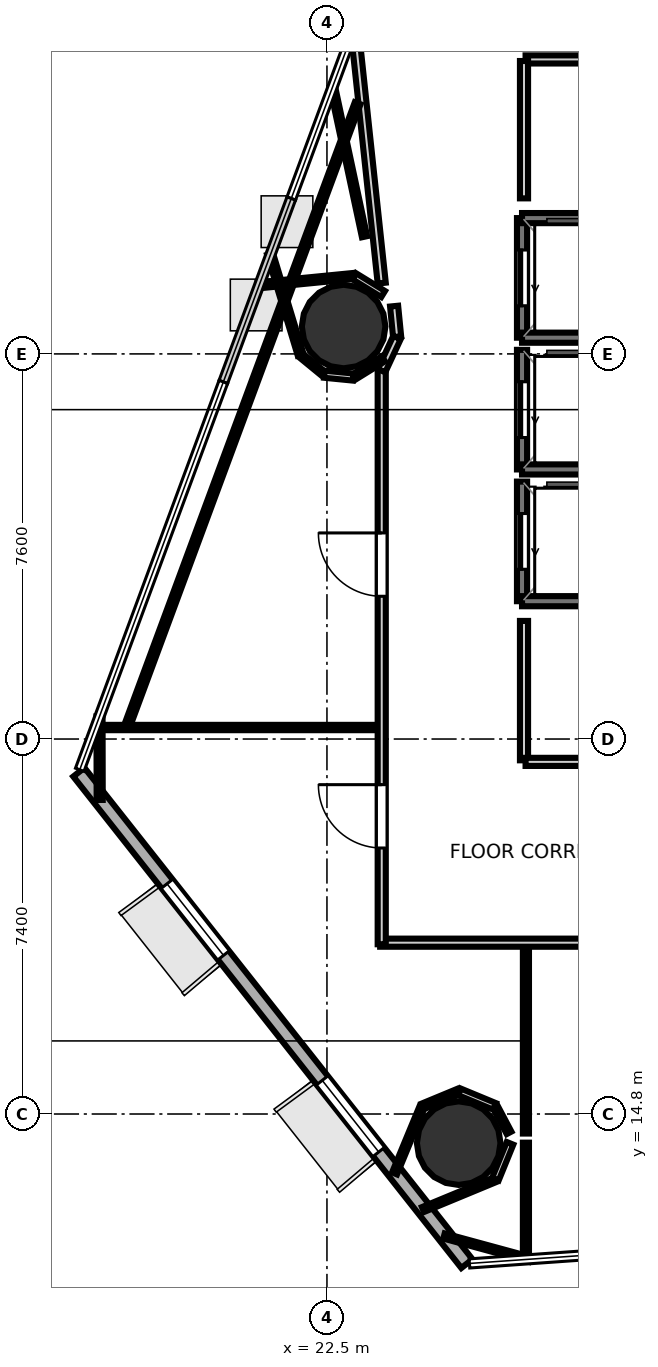
"""IFC4 building model, lengths in metres.
Left out: names, types, materials, properties, quantities, classifications, styles, units other than length and angle.
Written with IfcOpenShell. Run it as: python <this file> out.ifc"""

import sys

from ifc_helpers import new_model, si_unit, direction, frame, frame_2d, origin, origin_2d, place, context, subcontext, project, spatial, rectangle, hollow_circle, extrude, element, fill, save


model = new_model("IFC4")
c1 = context("Model", 3, precision=1e-05, world=origin(), true_north=direction((0.0, 1.0)))
c2 = subcontext(c1, "Body", "Model", "MODEL_VIEW")
j1 = project(units=[si_unit("LENGTHUNIT", "METRE"), si_unit("PLANEANGLEUNIT", "RADIAN")], contexts=[c1])
p1 = place(None, origin())
s1 = spatial("IfcSite", under=j1, at=p1, CompositionType="ELEMENT")
p2 = place(p1, origin())
s2 = spatial("IfcBuilding", under=s1, at=p2, CompositionType="ELEMENT")
p3 = place(p2, frame((0.0, 0.0, 59.9)))
s3 = spatial("IfcBuildingStorey", under=s2, at=p3, CompositionType="ELEMENT", Elevation=59.9)
for number, where, z_axis, x_axis in (
    (1, (22.829, 30.34, 0.0), (0.0, 0.0, 1.0), (1.0, 0.0, 0.0)),
    (2, (25.1, 14.225, 0.0), (0.0, 0.0, 1.0), (1.0, 0.0, 0.0)),
):
    element("IfcColumn", number, at=place(p3, frame(where, z_axis=z_axis, x_axis=x_axis)), inside=s3, PredefinedType="COLUMN", context=c2, shape_type="SweptSolid", body=[
        extrude(hollow_circle(Radius=0.825, WallThickness=0.04, at=origin_2d()), origin(), (0.0, 0.0, 1.0), 3.7),
    ])
p4 = place(p3, frame((17.604, 21.546, 0.0), z_axis=(0.0, 0.0, 1.0), x_axis=(0.619700014563, -0.784838768124, 0.0)))
e3 = element("IfcWall", 3, at=p4, inside=s3, PredefinedType="SOLIDWALL", context=c2, shape_type="SweptSolid", body=[
    extrude(rectangle(XDim=12.358, YDim=0.28, at=frame_2d((6.179, 0.0))), origin(), (0.0, 0.0, 1.0), 3.52),
])
p5 = place(p4, frame((2.807, 0.0, 0.85)))
e4 = element("IfcOpeningElement", 4, at=p5, cuts=e3, PredefinedType="OPENING", context=c2, shape_type="SweptSolid", body=[
    extrude(rectangle(XDim=1.8, YDim=2.1, at=frame_2d((0.9, 1.05))), frame((0.0, 0.15, 0.0), z_axis=(0.0, -1.0, 0.0), x_axis=(1.0, 0.0, 0.0)), (0.0, 0.0, 1.0), 0.3),
])
p6 = place(p4, frame((7.75, 0.0, 0.85)))
e5 = element("IfcOpeningElement", 5, at=p6, cuts=e3, PredefinedType="OPENING", context=c2, shape_type="SweptSolid", body=[
    extrude(rectangle(XDim=1.8, YDim=2.1, at=frame_2d((0.9, 1.05))), frame((0.0, 0.15, 0.0), z_axis=(0.0, -1.0, 0.0), x_axis=(1.0, 0.0, 0.0)), (0.0, 0.0, 1.0), 0.3),
])
p7 = place(p3, frame((26.35, 30.12, 0.0), z_axis=(0.0, 0.0, 1.0), x_axis=(0.0, 1.0, 0.0)))
e6 = element("IfcWall", 6, at=p7, inside=s3, PredefinedType="SOLIDWALL", context=c2, shape_type="SweptSolid", body=[
    extrude(rectangle(XDim=2.36, YDim=0.2, at=frame_2d((1.18, 0.0))), origin(), (0.0, 0.0, 1.0), 3.52),
])
p8 = place(p7, frame((0.63, 0.0, 0.0)))
e7 = element("IfcOpeningElement", 7, at=p8, cuts=e6, PredefinedType="OPENING", context=c2, shape_type="SweptSolid", body=[
    extrude(rectangle(XDim=1.1, YDim=2.15, at=frame_2d((0.55, 1.075))), frame((0.0, 0.11, 0.0), z_axis=(0.0, -1.0, 0.0), x_axis=(1.0, 0.0, 0.0)), (0.0, 0.0, 1.0), 0.22),
])
for number, where, z_axis, x_axis in (
    (8, (26.35, 32.48, 0.0), (0.0, 0.0, 1.0), (1.0, 0.0, 0.0)),
    (9, (26.35, 30.12, 0.0), (0.0, 0.0, 1.0), (1.0, 0.0, 0.0)),
):
    element("IfcWall", number, at=place(p3, frame(where, z_axis=z_axis, x_axis=x_axis)), inside=s3, PredefinedType="SOLIDWALL", context=c2, shape_type="SweptSolid", body=[
        extrude(rectangle(XDim=2.1, YDim=0.2, at=frame_2d((1.05, 0.0))), origin(), (0.0, 0.0, 1.0), 3.52),
    ])
p9 = place(p3, frame((26.35, 27.52, 0.0), z_axis=(0.0, 0.0, 1.0), x_axis=(0.0, 1.0, 0.0)))
e10 = element("IfcWall", 10, at=p9, inside=s3, PredefinedType="SOLIDWALL", context=c2, shape_type="SweptSolid", body=[
    extrude(rectangle(XDim=2.36, YDim=0.2, at=frame_2d((1.18, 0.0))), origin(), (0.0, 0.0, 1.0), 3.52),
])
p10 = place(p9, frame((0.63, 0.0, 0.0)))
e11 = element("IfcOpeningElement", 11, at=p10, cuts=e10, PredefinedType="OPENING", context=c2, shape_type="SweptSolid", body=[
    extrude(rectangle(XDim=1.1, YDim=2.15, at=frame_2d((0.55, 1.075))), frame((0.0, 0.11, 0.0), z_axis=(0.0, -1.0, 0.0), x_axis=(1.0, 0.0, 0.0)), (0.0, 0.0, 1.0), 0.22),
])
p11 = place(p3, frame((26.35, 27.52, 0.0), z_axis=(0.0, 0.0, 1.0), x_axis=(1.0, 0.0, 0.0)))
e12 = element("IfcWall", 12, at=p11, inside=s3, PredefinedType="SOLIDWALL", context=c2, shape_type="SweptSolid", body=[
    extrude(rectangle(XDim=2.1, YDim=0.2, at=frame_2d((1.05, 0.0))), origin(), (0.0, 0.0, 1.0), 3.52),
])
p12 = place(p3, frame((26.35, 24.92, 0.0), z_axis=(0.0, 0.0, 1.0), x_axis=(0.0, 1.0, 0.0)))
e13 = element("IfcWall", 13, at=p12, inside=s3, PredefinedType="SOLIDWALL", context=c2, shape_type="SweptSolid", body=[
    extrude(rectangle(XDim=2.36, YDim=0.2, at=frame_2d((1.18, 0.0))), origin(), (0.0, 0.0, 1.0), 3.52),
])
p13 = place(p12, frame((0.63, 0.0, 0.0)))
e14 = element("IfcOpeningElement", 14, at=p13, cuts=e13, PredefinedType="OPENING", context=c2, shape_type="SweptSolid", body=[
    extrude(rectangle(XDim=1.1, YDim=2.15, at=frame_2d((0.55, 1.075))), frame((0.0, 0.11, 0.0), z_axis=(0.0, -1.0, 0.0), x_axis=(1.0, 0.0, 0.0)), (0.0, 0.0, 1.0), 0.22),
])
p14 = place(p3, frame((26.35, 24.92, 0.0), z_axis=(0.0, 0.0, 1.0), x_axis=(1.0, 0.0, 0.0)))
e15 = element("IfcWall", 15, at=p14, inside=s3, PredefinedType="SOLIDWALL", context=c2, shape_type="SweptSolid", body=[
    extrude(rectangle(XDim=2.1, YDim=0.2, at=frame_2d((1.05, 0.0))), origin(), (0.0, 0.0, 1.0), 3.52),
])
p15 = place(p3, frame((23.581, 31.197, 0.0), z_axis=(0.0, 0.0, 1.0), x_axis=(-0.106272750785, 0.994337016529, 0.0)))
e16 = element("IfcWall", 16, at=p15, inside=s3, PredefinedType="PARTITIONING", context=c2, shape_type="SweptSolid", body=[
    extrude(rectangle(XDim=5.065, YDim=0.16, at=frame_2d((2.533, 0.0))), origin(), (0.0, 0.0, 1.0), 2.798),
])
p16 = place(p3, frame((29.7, 35.611, 0.0), z_axis=(0.0, 0.0, 1.0), x_axis=(-1.0, 0.0, 0.0)))
e17 = element("IfcWall", 17, at=p16, inside=s3, PredefinedType="PARTITIONING", context=c2, shape_type="SweptSolid", body=[
    extrude(rectangle(XDim=3.28, YDim=0.16, at=frame_2d((1.64, 0.0))), origin(), (0.0, 0.0, 1.0), 2.798),
])
p17 = place(p3, frame((26.389, 35.58, 0.0), z_axis=(0.0, 0.0, 1.0), x_axis=(0.0, -1.0, 0.0)))
e18 = element("IfcWall", 18, at=p17, inside=s3, PredefinedType="PARTITIONING", context=c2, shape_type="SweptSolid", body=[
    extrude(rectangle(XDim=2.71, YDim=0.16, at=frame_2d((1.355, 0.0))), origin(), (0.0, 0.0, 1.0), 2.798),
])
p18 = place(p3, frame((26.389, 24.531, 0.0), z_axis=(0.0, 0.0, 1.0), x_axis=(0.0, -1.0, 0.0)))
e19 = element("IfcWall", 19, at=p18, inside=s3, PredefinedType="PARTITIONING", context=c2, shape_type="SweptSolid", body=[
    extrude(rectangle(XDim=2.75, YDim=0.16, at=frame_2d((1.375, 0.0))), origin(), (0.0, 0.0, 1.0), 2.84),
])
p19 = place(p3, frame((26.42, 21.749, 0.0), z_axis=(0.0, 0.0, 1.0), x_axis=(1.0, 0.0, 0.0)))
e20 = element("IfcWall", 20, at=p19, inside=s3, PredefinedType="PARTITIONING", context=c2, shape_type="SweptSolid", body=[
    extrude(rectangle(XDim=3.28, YDim=0.16, at=frame_2d((1.64, 0.0))), origin(), (0.0, 0.0, 1.0), 2.84),
])
p20 = place(p3, frame((33.32, 18.181, 0.0), z_axis=(0.0, 0.0, 1.0), x_axis=(-1.0, 0.0, 0.0)))
e21 = element("IfcWall", 21, at=p20, inside=s3, PredefinedType="PARTITIONING", context=c2, shape_type="SweptSolid", body=[
    extrude(rectangle(XDim=9.77, YDim=0.16, at=frame_2d((4.885, 0.0))), origin(), (0.0, 0.0, 1.0), 2.798),
])
p21 = place(p3, frame((23.581, 18.15, 0.0), z_axis=(0.0, 0.0, 1.0), x_axis=(0.0, 1.0, 0.0)))
e22 = element("IfcWall", 22, at=p21, inside=s3, PredefinedType="PARTITIONING", context=c2, shape_type="SweptSolid", body=[
    extrude(rectangle(XDim=11.333, YDim=0.16, at=frame_2d((5.667, 0.0))), origin(), (0.0, 0.0, 1.0), 2.798),
])
p22 = place(p21, frame((1.899, 0.0, 0.0)))
e23 = element("IfcOpeningElement", 23, at=p22, cuts=e22, PredefinedType="OPENING", context=c2, shape_type="SweptSolid", body=[
    extrude(rectangle(XDim=1.25, YDim=2.2, at=frame_2d((0.625, 1.1))), frame((0.0, 0.09, 0.0), z_axis=(0.0, -1.0, 0.0), x_axis=(1.0, 0.0, 0.0)), (0.0, 0.0, 1.0), 0.18),
])
p23 = place(p21, frame((6.867, 0.0, 0.0)))
e24 = element("IfcOpeningElement", 24, at=p23, cuts=e22, PredefinedType="OPENING", context=c2, shape_type="SweptSolid", body=[
    extrude(rectangle(XDim=1.25, YDim=2.2, at=frame_2d((0.625, 1.1))), frame((0.0, 0.09, 0.0), z_axis=(0.0, -1.0, 0.0), x_axis=(1.0, 0.0, 0.0)), (0.0, 0.0, 1.0), 0.18),
])
p24 = place(p3, frame((23.578, 29.47, 0.0), z_axis=(0.0, 0.0, 1.0), x_axis=(0.421827918194, 0.906675910914, 0.0)))
e25 = element("IfcWall", 25, at=p24, inside=s3, PredefinedType="PARTITIONING", context=c2, shape_type="SweptSolid", body=[
    extrude(rectangle(XDim=0.72, YDim=0.16, at=frame_2d((0.36, 0.0))), origin(), (0.0, 0.0, 1.0), 2.84),
])
p25 = place(p3, frame((23.885, 30.139, 0.0), z_axis=(0.0, 0.0, 1.0), x_axis=(-0.0981888168, 0.995167803064, 0.0)))
e26 = element("IfcWall", 26, at=p25, inside=s3, PredefinedType="PARTITIONING", context=c2, shape_type="SweptSolid", body=[
    extrude(rectangle(XDim=0.607, YDim=0.16, at=frame_2d((0.303, 0.0))), origin(), (0.0, 0.0, 1.0), 2.84),
])
p26 = place(p3, frame((26.427, 18.07, 0.0), z_axis=(0.0, 0.0, 1.0), x_axis=(0.0, -1.0, 0.0)))
e27 = element("IfcWall", 27, at=p26, inside=s3, PredefinedType="PARTITIONING", context=c2, shape_type="SweptSolid", body=[
    extrude(rectangle(XDim=3.656, YDim=0.12, at=frame_2d((1.828, 0.0))), origin(), (0.0, 0.0, 1.0), 2.798),
])
p27 = place(p3, frame((26.094, 14.428, 0.0), z_axis=(0.0, 0.0, 1.0), x_axis=(-0.468979373437, 0.883209118663, 0.0)))
e28 = element("IfcWall", 28, at=p27, inside=s3, PredefinedType="PARTITIONING", context=c2, shape_type="SweptSolid", body=[
    extrude(rectangle(XDim=0.575, YDim=0.105, at=frame_2d((0.288, 0.0))), origin(), (0.0, 0.0, 1.0), 2.798),
])
p28 = place(p3, frame((25.808, 14.95, 0.0), z_axis=(0.0, 0.0, 1.0), x_axis=(-0.923965532966, 0.382475742879, 0.0)))
e29 = element("IfcWall", 29, at=p28, inside=s3, PredefinedType="PARTITIONING", context=c2, shape_type="SweptSolid", body=[
    extrude(rectangle(XDim=0.754, YDim=0.14, at=frame_2d((0.377, 0.0))), origin(), (0.0, 0.0, 1.0), 2.798),
])
p29 = place(p3, frame((25.088, 15.239, 0.0), z_axis=(0.0, 0.0, 1.0), x_axis=(-0.923965532966, -0.382475742879, 0.0)))
e30 = element("IfcWall", 30, at=p29, inside=s3, PredefinedType="PARTITIONING", context=c2, shape_type="SweptSolid", body=[
    extrude(rectangle(XDim=0.754, YDim=0.12, at=frame_2d((0.377, 0.0))), origin(), (0.0, 0.0, 1.0), 2.798),
])
p30 = place(p3, frame((24.375, 14.933, 0.0), z_axis=(0.0, 0.0, 1.0), x_axis=(-0.382799302266, -0.923831529114, 0.0)))
e31 = element("IfcWall", 31, at=p30, inside=s3, PredefinedType="PARTITIONING", context=c2, shape_type="SweptSolid", body=[
    extrude(rectangle(XDim=1.413, YDim=0.105, at=frame_2d((0.707, 0.0))), origin(), (0.0, 0.0, 1.0), 2.84),
])
p31 = place(p3, frame((24.395, 12.914, 0.0), z_axis=(0.0, 0.0, 1.0), x_axis=(0.923816459452, 0.382835668721, 0.0)))
e32 = element("IfcWall", 32, at=p31, inside=s3, PredefinedType="PARTITIONING", context=c2, shape_type="SweptSolid", body=[
    extrude(rectangle(XDim=1.53, YDim=0.105, at=frame_2d((0.765, 0.0))), origin(), (0.0, 0.0, 1.0), 2.84),
])
p32 = place(p3, frame((25.825, 13.517, 0.0), z_axis=(0.0, 0.0, 1.0), x_axis=(0.377796007695, 0.925888857569, 0.0)))
e33 = element("IfcWall", 33, at=p32, inside=s3, PredefinedType="PARTITIONING", context=c2, shape_type="SweptSolid", body=[
    extrude(rectangle(XDim=0.761, YDim=0.14, at=frame_2d((0.381, 0.0))), origin(), (0.0, 0.0, 1.0), 2.798),
])
p33 = place(p3, frame((26.427, 14.235, 0.0), z_axis=(0.0, 0.0, 1.0), x_axis=(0.0, -1.0, 0.0)))
e34 = element("IfcWall", 34, at=p33, inside=s3, PredefinedType="PARTITIONING", context=c2, shape_type="SweptSolid", body=[
    extrude(rectangle(XDim=2.325, YDim=0.12, at=frame_2d((1.163, 0.0))), origin(), (0.0, 0.0, 1.0), 2.798),
])
p34 = place(p3, frame((26.496, 11.934, 0.0), z_axis=(0.0, 0.0, 1.0), x_axis=(-0.964931269473, 0.262502657498, 0.0)))
e35 = element("IfcWall", 35, at=p34, inside=s3, PredefinedType="PARTITIONING", context=c2, shape_type="SweptSolid", body=[
    extrude(rectangle(XDim=1.748, YDim=0.105, at=frame_2d((0.874, 0.0))), origin(), (0.0, 0.0, 1.0), 2.84),
])
p35 = place(p3, frame((18.015, 20.998, 0.0), z_axis=(0.0, 0.0, 1.0), x_axis=(-0.002220571875, 0.999997534527, 0.0)))
e36 = element("IfcWall", 36, at=p35, inside=s3, PredefinedType="PARTITIONING", context=c2, shape_type="SweptSolid", body=[
    extrude(rectangle(XDim=1.649, YDim=0.12, at=frame_2d((0.825, 0.0))), origin(), (0.0, 0.0, 1.0), 2.84),
])
p36 = place(p3, frame((17.91, 22.427, 0.0), z_axis=(0.0, 0.0, 1.0), x_axis=(1.0, 0.0, 0.0)))
e37 = element("IfcWall", 37, at=p36, inside=s3, PredefinedType="PARTITIONING", context=c2, shape_type="SweptSolid", body=[
    extrude(rectangle(XDim=5.56, YDim=0.105, at=frame_2d((2.78, 0.0))), origin(), (0.0, 0.0, 1.0), 2.84),
])
p37 = place(p3, frame((23.608, 30.982, 0.0), z_axis=(0.0, 0.0, 1.0), x_axis=(-0.852045812822, 0.523467222328, 0.0)))
e38 = element("IfcWall", 38, at=p37, inside=s3, PredefinedType="PARTITIONING", context=c2, shape_type="SweptSolid", body=[
    extrude(rectangle(XDim=0.67, YDim=0.14, at=frame_2d((0.335, 0.0))), origin(), (0.0, 0.0, 1.0), 2.798),
])
p38 = place(p3, frame((23.018, 31.337, 0.0), z_axis=(0.0, 0.0, 1.0), x_axis=(-0.995197410875, -0.097888269922, 0.0)))
e39 = element("IfcWall", 39, at=p38, inside=s3, PredefinedType="PARTITIONING", context=c2, shape_type="SweptSolid", body=[
    extrude(rectangle(XDim=1.885, YDim=0.12, at=frame_2d((0.943, 0.0))), origin(), (0.0, 0.0, 1.0), 2.798),
])
p39 = place(p3, frame((21.377, 31.771, 0.0), z_axis=(0.0, 0.0, 1.0), x_axis=(0.2903009614, -0.956935395839, 0.0)))
e40 = element("IfcWall", 40, at=p39, inside=s3, PredefinedType="PARTITIONING", context=c2, shape_type="SweptSolid", body=[
    extrude(rectangle(XDim=2.077, YDim=0.12, at=frame_2d((1.039, 0.0))), origin(), (0.0, 0.0, 1.0), 2.798),
])
p40 = place(p3, frame((21.99, 29.769, 0.0), z_axis=(0.0, 0.0, 1.0), x_axis=(0.773062635709, -0.634329694458, 0.0)))
e41 = element("IfcWall", 41, at=p40, inside=s3, PredefinedType="PARTITIONING", context=c2, shape_type="SweptSolid", body=[
    extrude(rectangle(XDim=0.572, YDim=0.105, at=frame_2d((0.286, 0.0))), origin(), (0.0, 0.0, 1.0), 2.84),
])
p41 = place(p3, frame((22.449, 29.399, 0.0), z_axis=(0.0, 0.0, 1.0), x_axis=(0.995167364461, -0.098193262045, 0.0)))
e42 = element("IfcWall", 42, at=p41, inside=s3, PredefinedType="PARTITIONING", context=c2, shape_type="SweptSolid", body=[
    extrude(rectangle(XDim=0.572, YDim=0.14, at=frame_2d((0.286, 0.0))), origin(), (0.0, 0.0, 1.0), 2.798),
])
p42 = place(p3, frame((23.038, 29.348, 0.0), z_axis=(0.0, 0.0, 1.0), x_axis=(0.850157603054, 0.526528299306, 0.0)))
e43 = element("IfcWall", 43, at=p42, inside=s3, PredefinedType="PARTITIONING", context=c2, shape_type="SweptSolid", body=[
    extrude(rectangle(XDim=0.677, YDim=0.12, at=frame_2d((0.339, 0.0))), origin(), (0.0, 0.0, 1.0), 2.798),
])
p43 = place(p3, frame((18.583, 22.531, 0.0), z_axis=(0.0, 0.0, 1.0), x_axis=(0.347261250583, 0.937768427622, 0.0)))
e44 = element("IfcWall", 44, at=p43, inside=s3, PredefinedType="PARTITIONING", context=c2, shape_type="SweptSolid", body=[
    extrude(rectangle(XDim=13.027, YDim=0.12, at=frame_2d((6.513, 0.0))), origin(), (0.0, 0.0, 1.0), 2.798),
])
p44 = place(p3, frame((22.61, 35.065, 0.0), z_axis=(0.0, 0.0, 1.0), x_axis=(0.209252989805, -0.977861537365, 0.0)))
e45 = element("IfcWall", 45, at=p44, inside=s3, PredefinedType="PARTITIONING", context=c2, shape_type="SweptSolid", body=[
    extrude(rectangle(XDim=3.02, YDim=0.105, at=frame_2d((1.51, 0.0))), origin(), (0.0, 0.0, 1.0), 2.84),
])
p45 = place(p8, origin())
e46 = element("IfcDoor", 46, at=p45, inside=s3, OperationType="SLIDING_TO_LEFT", PredefinedType="DOOR", context=c2, shape_type="SweptSolid", body=[
    extrude(rectangle(XDim=1.1, YDim=2.15, at=frame_2d((0.55, 1.075))), frame((0.0, 0.025, 0.0), z_axis=(0.0, -1.0, 0.0), x_axis=(1.0, 0.0, 0.0)), (0.0, 0.0, 1.0), 0.05),
])
fill(e7, e46)
p46 = place(p10, origin())
e47 = element("IfcDoor", 47, at=p46, inside=s3, OperationType="SLIDING_TO_LEFT", PredefinedType="DOOR", context=c2, shape_type="SweptSolid", body=[
    extrude(rectangle(XDim=1.1, YDim=2.15, at=frame_2d((0.55, 1.075))), frame((0.0, 0.025, 0.0), z_axis=(0.0, -1.0, 0.0), x_axis=(1.0, 0.0, 0.0)), (0.0, 0.0, 1.0), 0.05),
])
fill(e11, e47)
p47 = place(p13, origin())
e48 = element("IfcDoor", 48, at=p47, inside=s3, OperationType="SLIDING_TO_LEFT", PredefinedType="DOOR", context=c2, shape_type="SweptSolid", body=[
    extrude(rectangle(XDim=1.1, YDim=2.15, at=frame_2d((0.55, 1.075))), frame((0.0, 0.025, 0.0), z_axis=(0.0, -1.0, 0.0), x_axis=(1.0, 0.0, 0.0)), (0.0, 0.0, 1.0), 0.05),
])
fill(e14, e48)
p48 = place(p22, origin())
e49 = element("IfcDoor", 49, at=p48, inside=s3, OperationType="SINGLE_SWING_RIGHT", PredefinedType="DOOR", context=c2, shape_type="SweptSolid", body=[
    extrude(rectangle(XDim=1.25, YDim=2.2, at=frame_2d((0.625, 1.1))), frame((0.0, 0.025, 0.0), z_axis=(0.0, -1.0, 0.0), x_axis=(1.0, 0.0, 0.0)), (0.0, 0.0, 1.0), 0.05),
])
fill(e23, e49)
p49 = place(p23, origin())
e50 = element("IfcDoor", 50, at=p49, inside=s3, OperationType="SINGLE_SWING_RIGHT", PredefinedType="DOOR", context=c2, shape_type="SweptSolid", body=[
    extrude(rectangle(XDim=1.25, YDim=2.2, at=frame_2d((0.625, 1.1))), frame((0.0, 0.025, 0.0), z_axis=(0.0, -1.0, 0.0), x_axis=(1.0, 0.0, 0.0)), (0.0, 0.0, 1.0), 0.05),
])
fill(e24, e50)
p50 = place(p5, origin())
e51 = element("IfcWindow", 51, at=p50, inside=s3, PartitioningType="SINGLE_PANEL", PredefinedType="WINDOW", context=c2, shape_type="SweptSolid", body=[
    extrude(rectangle(XDim=1.8, YDim=2.1, at=frame_2d((0.9, 1.05))), frame((0.0, 0.03, 0.0), z_axis=(0.0, -1.0, 0.0), x_axis=(1.0, 0.0, 0.0)), (0.0, 0.0, 1.0), 0.06),
])
fill(e4, e51)
p51 = place(p6, origin())
e52 = element("IfcWindow", 52, at=p51, inside=s3, PartitioningType="SINGLE_PANEL", PredefinedType="WINDOW", context=c2, shape_type="SweptSolid", body=[
    extrude(rectangle(XDim=1.8, YDim=2.1, at=frame_2d((0.9, 1.05))), frame((0.0, 0.03, 0.0), z_axis=(0.0, -1.0, 0.0), x_axis=(1.0, 0.0, 0.0)), (0.0, 0.0, 1.0), 0.06),
])
fill(e5, e52)
save(model, sys.argv[1])
